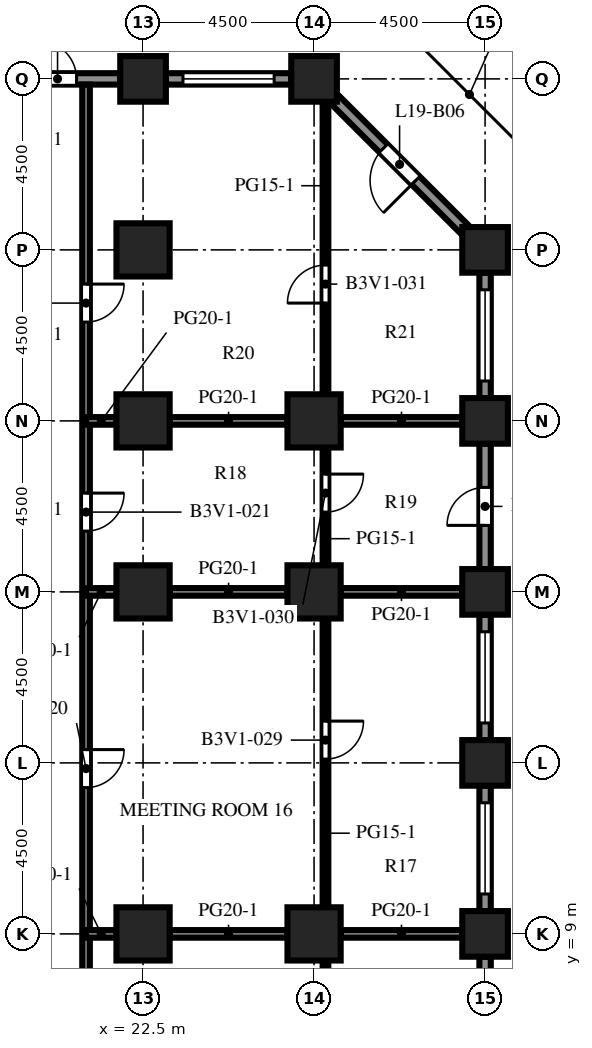
"""IFC4 building model, lengths in metres.
Left out: names, types, materials, properties, quantities, classifications, styles, units other than length and angle.
Written with IfcOpenShell. Run it as: python <this file> out.ifc"""

import sys

from ifc_helpers import new_model, si_unit, direction, frame, frame_2d, origin, origin_2d, place, context, subcontext, project, spatial, rectangle, extrude, element, fill, save


model = new_model("IFC4")
c1 = context("Model", 3, precision=1e-05, world=origin(), true_north=direction((0.0, 1.0)))
c2 = subcontext(c1, "Body", "Model", "MODEL_VIEW")
j1 = project(units=[si_unit("LENGTHUNIT", "METRE"), si_unit("PLANEANGLEUNIT", "RADIAN")], contexts=[c1])
p1 = place(None, origin())
s1 = spatial("IfcSite", under=j1, at=p1, CompositionType="ELEMENT")
p2 = place(p1, origin())
s2 = spatial("IfcBuilding", under=s1, at=p2, CompositionType="ELEMENT")
p3 = place(p2, frame((0.0, 0.0, 86.1)))
s3 = spatial("IfcBuildingStorey", under=s2, at=p3, CompositionType="ELEMENT", Elevation=86.1)
for number, where, z_axis, x_axis in (
    (1, (22.5, 31.5, 0.0), (0.0, 0.0, 1.0), (1.0, 0.0, 0.0)),
    (2, (27.0, 31.5, 0.0), (0.0, 0.0, 1.0), (1.0, 0.0, 0.0)),
    (3, (31.5, 9.0, 0.0), (0.0, 0.0, 1.0), (1.0, 0.0, 0.0)),
    (4, (31.5, 13.5, 0.0), (0.0, 0.0, 1.0), (1.0, 0.0, 0.0)),
    (5, (31.5, 18.0, 0.0), (0.0, 0.0, 1.0), (1.0, 0.0, 0.0)),
    (6, (31.5, 22.5, 0.0), (0.0, 0.0, 1.0), (1.0, 0.0, 0.0)),
    (7, (31.5, 27.0, 0.0), (0.0, 0.0, 1.0), (1.0, 0.0, 0.0)),
):
    element("IfcColumn", number, at=place(p3, frame(where, z_axis=z_axis, x_axis=x_axis)), inside=s3, PredefinedType="COLUMN", context=c2, shape_type="SweptSolid", body=[
        extrude(rectangle(XDim=1.2, YDim=1.2, at=origin_2d()), origin(), (0.0, 0.0, 1.0), 4.1),
    ])
for number, where, z_axis, x_axis in (
    (8, (22.5, 9.0, 0.0), (0.0, 0.0, 1.0), (1.0, 0.0, 0.0)),
    (9, (22.5, 18.0, 0.0), (0.0, 0.0, 1.0), (1.0, 0.0, 0.0)),
    (10, (22.5, 22.5, 0.0), (0.0, 0.0, 1.0), (1.0, 0.0, 0.0)),
    (11, (22.5, 27.0, 0.0), (0.0, 0.0, 1.0), (1.0, 0.0, 0.0)),
    (12, (27.0, 9.0, 0.0), (0.0, 0.0, 1.0), (1.0, 0.0, 0.0)),
    (13, (27.0, 18.0, 0.0), (0.0, 0.0, 1.0), (1.0, 0.0, 0.0)),
    (14, (27.0, 22.5, 0.0), (0.0, 0.0, 1.0), (1.0, 0.0, 0.0)),
):
    element("IfcColumn", number, at=place(p3, frame(where, z_axis=z_axis, x_axis=x_axis)), inside=s3, PredefinedType="COLUMN", context=c2, shape_type="SweptSolid", body=[
        extrude(rectangle(XDim=1.4, YDim=1.4, at=origin_2d()), origin(), (0.0, 0.0, 1.0), 4.1),
    ])
p4 = place(p3, frame((31.5, 8.4, 0.0), z_axis=(0.0, 0.0, 1.0), x_axis=(0.0, -1.0, 0.0)))
e15 = element("IfcWall", 15, at=p4, inside=s3, PredefinedType="SOLIDWALL", context=c2, shape_type="SweptSolid", body=[
    extrude(rectangle(XDim=3.3, YDim=0.3, at=frame_2d((1.65, 0.0))), origin(), (0.0, 0.0, 1.0), 2.75),
])
p5 = place(p4, frame((0.45, 0.0, 0.8)))
e16 = element("IfcOpeningElement", 16, at=p5, cuts=e15, PredefinedType="OPENING", context=c2, shape_type="SweptSolid", body=[
    extrude(rectangle(XDim=2.4, YDim=1.7, at=frame_2d((1.2, 0.85))), frame((0.0, 0.16, 0.0), z_axis=(0.0, -1.0, 0.0), x_axis=(1.0, 0.0, 0.0)), (0.0, 0.0, 1.0), 0.32),
])
p6 = place(p3, frame((31.5, 12.9, 0.0), z_axis=(0.0, 0.0, 1.0), x_axis=(0.0, -1.0, 0.0)))
e17 = element("IfcWall", 17, at=p6, inside=s3, PredefinedType="SOLIDWALL", context=c2, shape_type="SweptSolid", body=[
    extrude(rectangle(XDim=3.3, YDim=0.3, at=frame_2d((1.65, 0.0))), origin(), (0.0, 0.0, 1.0), 2.75),
])
p7 = place(p6, frame((0.45, 0.0, 0.8)))
e18 = element("IfcOpeningElement", 18, at=p7, cuts=e17, PredefinedType="OPENING", context=c2, shape_type="SweptSolid", body=[
    extrude(rectangle(XDim=2.4, YDim=1.7, at=frame_2d((1.2, 0.85))), frame((0.0, 0.16, 0.0), z_axis=(0.0, -1.0, 0.0), x_axis=(1.0, 0.0, 0.0)), (0.0, 0.0, 1.0), 0.32),
])
p8 = place(p3, frame((31.5, 17.4, 0.0), z_axis=(0.0, 0.0, 1.0), x_axis=(0.0, -1.0, 0.0)))
e19 = element("IfcWall", 19, at=p8, inside=s3, PredefinedType="SOLIDWALL", context=c2, shape_type="SweptSolid", body=[
    extrude(rectangle(XDim=3.3, YDim=0.3, at=frame_2d((1.65, 0.0))), origin(), (0.0, 0.0, 1.0), 2.75),
])
p9 = place(p8, frame((0.45, 0.0, 0.8)))
e20 = element("IfcOpeningElement", 20, at=p9, cuts=e19, PredefinedType="OPENING", context=c2, shape_type="SweptSolid", body=[
    extrude(rectangle(XDim=2.4, YDim=1.7, at=frame_2d((1.2, 0.85))), frame((0.0, 0.16, 0.0), z_axis=(0.0, -1.0, 0.0), x_axis=(1.0, 0.0, 0.0)), (0.0, 0.0, 1.0), 0.32),
])
p10 = place(p3, frame((31.5, 21.9, 0.0), z_axis=(0.0, 0.0, 1.0), x_axis=(0.0, -1.0, 0.0)))
e21 = element("IfcWall", 21, at=p10, inside=s3, PredefinedType="SOLIDWALL", context=c2, shape_type="SweptSolid", body=[
    extrude(rectangle(XDim=3.3, YDim=0.3, at=frame_2d((1.65, 0.0))), origin(), (0.0, 0.0, 1.0), 2.75),
])
p11 = place(p10, frame((1.15, 0.0, 0.0)))
e22 = element("IfcOpeningElement", 22, at=p11, cuts=e21, PredefinedType="OPENING", context=c2, shape_type="SweptSolid", body=[
    extrude(rectangle(XDim=1.0, YDim=2.2, at=frame_2d((0.5, 1.1))), frame((0.0, 0.16, 0.0), z_axis=(0.0, -1.0, 0.0), x_axis=(1.0, 0.0, 0.0)), (0.0, 0.0, 1.0), 0.32),
])
p12 = place(p3, frame((31.5, 26.4, 0.0), z_axis=(0.0, 0.0, 1.0), x_axis=(0.0, -1.0, 0.0)))
e23 = element("IfcWall", 23, at=p12, inside=s3, PredefinedType="SOLIDWALL", context=c2, shape_type="SweptSolid", body=[
    extrude(rectangle(XDim=3.3, YDim=0.3, at=frame_2d((1.65, 0.0))), origin(), (0.0, 0.0, 1.0), 2.75),
])
p13 = place(p12, frame((0.45, 0.0, 0.8)))
e24 = element("IfcOpeningElement", 24, at=p13, cuts=e23, PredefinedType="OPENING", context=c2, shape_type="SweptSolid", body=[
    extrude(rectangle(XDim=2.4, YDim=1.7, at=frame_2d((1.2, 0.85))), frame((0.0, 0.16, 0.0), z_axis=(0.0, -1.0, 0.0), x_axis=(1.0, 0.0, 0.0)), (0.0, 0.0, 1.0), 0.32),
])
p14 = place(p3, frame((27.494, 31.006, 0.0), z_axis=(0.0, 0.0, 1.0), x_axis=(0.707106781187, -0.707106781187, 0.0)))
e25 = element("IfcWall", 25, at=p14, inside=s3, PredefinedType="SOLIDWALL", context=c2, shape_type="SweptSolid", body=[
    extrude(rectangle(XDim=4.967, YDim=0.3, at=frame_2d((2.483, 0.0))), origin(), (0.0, 0.0, 1.0), 2.75),
])
p15 = place(p14, frame((1.884, 0.0, 0.0)))
e26 = element("IfcOpeningElement", 26, at=p15, cuts=e25, PredefinedType="OPENING", context=c2, shape_type="SweptSolid", body=[
    extrude(rectangle(XDim=1.2, YDim=2.2, at=frame_2d((0.6, 1.1))), frame((0.0, 0.16, 0.0), z_axis=(0.0, -1.0, 0.0), x_axis=(1.0, 0.0, 0.0)), (0.0, 0.0, 1.0), 0.32),
])
p16 = place(p3, frame((23.1, 31.5, 0.0), z_axis=(0.0, 0.0, 1.0), x_axis=(1.0, 0.0, 0.0)))
e27 = element("IfcWall", 27, at=p16, inside=s3, PredefinedType="SOLIDWALL", context=c2, shape_type="SweptSolid", body=[
    extrude(rectangle(XDim=3.3, YDim=0.3, at=frame_2d((1.65, 0.0))), origin(), (0.0, 0.0, 1.0), 2.75),
])
p17 = place(p16, frame((0.45, 0.0, 0.8)))
e28 = element("IfcOpeningElement", 28, at=p17, cuts=e27, PredefinedType="OPENING", context=c2, shape_type="SweptSolid", body=[
    extrude(rectangle(XDim=2.4, YDim=1.7, at=frame_2d((1.2, 0.85))), frame((0.0, 0.16, 0.0), z_axis=(0.0, -1.0, 0.0), x_axis=(1.0, 0.0, 0.0)), (0.0, 0.0, 1.0), 0.32),
])
p18 = place(p3, frame((18.6, 31.5, 0.0), z_axis=(0.0, 0.0, 1.0), x_axis=(1.0, 0.0, 0.0)))
e29 = element("IfcWall", 29, at=p18, inside=s3, PredefinedType="SOLIDWALL", context=c2, shape_type="SweptSolid", body=[
    extrude(rectangle(XDim=3.3, YDim=0.3, at=frame_2d((1.65, 0.0))), origin(), (0.0, 0.0, 1.0), 2.75),
])
p19 = place(p18, frame((1.15, 0.0, 0.0)))
e30 = element("IfcOpeningElement", 30, at=p19, cuts=e29, PredefinedType="OPENING", context=c2, shape_type="SweptSolid", body=[
    extrude(rectangle(XDim=1.0, YDim=2.2, at=frame_2d((0.5, 1.1))), frame((0.0, 0.16, 0.0), z_axis=(0.0, -1.0, 0.0), x_axis=(1.0, 0.0, 0.0)), (0.0, 0.0, 1.0), 0.32),
])
p20 = place(p3, frame((21.0, 31.35, 0.0), z_axis=(0.0, 0.0, 1.0), x_axis=(0.0, -1.0, 0.0)))
e31 = element("IfcWall", 31, at=p20, inside=s3, PredefinedType="PARTITIONING", context=c2, shape_type="SweptSolid", body=[
    extrude(rectangle(XDim=53.7, YDim=0.2, at=frame_2d((26.85, 0.0))), origin(), (0.0, 0.0, 1.0), 3.65),
])
p21 = place(p20, frame((47.5, 0.0, 0.0)))
e32 = element("IfcOpeningElement", 32, at=p21, cuts=e31, PredefinedType="OPENING", context=c2, shape_type="SweptSolid", body=[
    extrude(rectangle(XDim=1.0, YDim=2.1, at=frame_2d((0.5, 1.05))), frame((0.0, 0.11, 0.0), z_axis=(0.0, -1.0, 0.0), x_axis=(1.0, 0.0, 0.0)), (0.0, 0.0, 1.0), 0.22),
])
p22 = place(p20, frame((37.5, 0.0, 0.0)))
e33 = element("IfcOpeningElement", 33, at=p22, cuts=e31, PredefinedType="OPENING", context=c2, shape_type="SweptSolid", body=[
    extrude(rectangle(XDim=1.0, YDim=2.1, at=frame_2d((0.5, 1.05))), frame((0.0, 0.11, 0.0), z_axis=(0.0, -1.0, 0.0), x_axis=(1.0, 0.0, 0.0)), (0.0, 0.0, 1.0), 0.22),
])
p23 = place(p20, frame((27.25, 0.0, 0.0)))
e34 = element("IfcOpeningElement", 34, at=p23, cuts=e31, PredefinedType="OPENING", context=c2, shape_type="SweptSolid", body=[
    extrude(rectangle(XDim=1.0, YDim=2.1, at=frame_2d((0.5, 1.05))), frame((0.0, 0.11, 0.0), z_axis=(0.0, -1.0, 0.0), x_axis=(1.0, 0.0, 0.0)), (0.0, 0.0, 1.0), 0.22),
])
p24 = place(p20, frame((17.5, 0.0, 0.0)))
e35 = element("IfcOpeningElement", 35, at=p24, cuts=e31, PredefinedType="OPENING", context=c2, shape_type="SweptSolid", body=[
    extrude(rectangle(XDim=1.0, YDim=2.1, at=frame_2d((0.5, 1.05))), frame((0.0, 0.11, 0.0), z_axis=(0.0, -1.0, 0.0), x_axis=(1.0, 0.0, 0.0)), (0.0, 0.0, 1.0), 0.22),
])
p25 = place(p20, frame((10.75, 0.0, 0.0)))
e36 = element("IfcOpeningElement", 36, at=p25, cuts=e31, PredefinedType="OPENING", context=c2, shape_type="SweptSolid", body=[
    extrude(rectangle(XDim=1.0, YDim=2.1, at=frame_2d((0.5, 1.05))), frame((0.0, 0.11, 0.0), z_axis=(0.0, -1.0, 0.0), x_axis=(1.0, 0.0, 0.0)), (0.0, 0.0, 1.0), 0.22),
])
p26 = place(p20, frame((5.25, 0.0, 0.0)))
e37 = element("IfcOpeningElement", 37, at=p26, cuts=e31, PredefinedType="OPENING", context=c2, shape_type="SweptSolid", body=[
    extrude(rectangle(XDim=1.0, YDim=2.1, at=frame_2d((0.5, 1.05))), frame((0.0, 0.11, 0.0), z_axis=(0.0, -1.0, 0.0), x_axis=(1.0, 0.0, 0.0)), (0.0, 0.0, 1.0), 0.22),
])
p27 = place(p3, frame((27.3, 8.3, 0.0), z_axis=(0.0, 0.0, 1.0), x_axis=(0.0, -1.0, 0.0)))
e38 = element("IfcWall", 38, at=p27, inside=s3, PredefinedType="PARTITIONING", context=c2, shape_type="SweptSolid", body=[
    extrude(rectangle(XDim=7.6, YDim=0.15, at=frame_2d((3.8, 0.0))), origin(), (0.0, 0.0, 1.0), 3.65),
])
p28 = place(p27, frame((2.7, 0.0, 0.0)))
e39 = element("IfcOpeningElement", 39, at=p28, cuts=e38, PredefinedType="OPENING", context=c2, shape_type="SweptSolid", body=[
    extrude(rectangle(XDim=1.0, YDim=2.1, at=frame_2d((0.5, 1.05))), frame((0.0, 0.085, 0.0), z_axis=(0.0, -1.0, 0.0), x_axis=(1.0, 0.0, 0.0)), (0.0, 0.0, 1.0), 0.17),
])
p29 = place(p3, frame((27.3, 17.3, 0.0), z_axis=(0.0, 0.0, 1.0), x_axis=(0.0, -1.0, 0.0)))
e40 = element("IfcWall", 40, at=p29, inside=s3, PredefinedType="PARTITIONING", context=c2, shape_type="SweptSolid", body=[
    extrude(rectangle(XDim=7.6, YDim=0.15, at=frame_2d((3.8, 0.0))), origin(), (0.0, 0.0, 1.0), 3.65),
])
p30 = place(p29, frame((2.7, 0.0, 0.0)))
e41 = element("IfcOpeningElement", 41, at=p30, cuts=e40, PredefinedType="OPENING", context=c2, shape_type="SweptSolid", body=[
    extrude(rectangle(XDim=1.0, YDim=2.1, at=frame_2d((0.5, 1.05))), frame((0.0, 0.085, 0.0), z_axis=(0.0, -1.0, 0.0), x_axis=(1.0, 0.0, 0.0)), (0.0, 0.0, 1.0), 0.17),
])
p31 = place(p3, frame((27.3, 21.8, 0.0), z_axis=(0.0, 0.0, 1.0), x_axis=(0.0, -1.0, 0.0)))
e42 = element("IfcWall", 42, at=p31, inside=s3, PredefinedType="PARTITIONING", context=c2, shape_type="SweptSolid", body=[
    extrude(rectangle(XDim=3.1, YDim=0.15, at=frame_2d((1.55, 0.0))), origin(), (0.0, 0.0, 1.0), 3.65),
])
p32 = place(p31, frame((0.7, 0.0, 0.0)))
e43 = element("IfcOpeningElement", 43, at=p32, cuts=e42, PredefinedType="OPENING", context=c2, shape_type="SweptSolid", body=[
    extrude(rectangle(XDim=1.0, YDim=2.1, at=frame_2d((0.5, 1.05))), frame((0.0, 0.085, 0.0), z_axis=(0.0, -1.0, 0.0), x_axis=(1.0, 0.0, 0.0)), (0.0, 0.0, 1.0), 0.17),
])
p33 = place(p3, frame((27.3, 30.777, 0.0), z_axis=(0.0, 0.0, 1.0), x_axis=(0.0, -1.0, 0.0)))
e44 = element("IfcWall", 44, at=p33, inside=s3, PredefinedType="PARTITIONING", context=c2, shape_type="SweptSolid", body=[
    extrude(rectangle(XDim=7.577, YDim=0.15, at=frame_2d((3.789, 0.0))), origin(), (0.0, 0.0, 1.0), 3.65),
])
p34 = place(p33, frame((4.177, 0.0, 0.0)))
e45 = element("IfcOpeningElement", 45, at=p34, cuts=e44, PredefinedType="OPENING", context=c2, shape_type="SweptSolid", body=[
    extrude(rectangle(XDim=1.0, YDim=2.1, at=frame_2d((0.5, 1.05))), frame((0.0, 0.085, 0.0), z_axis=(0.0, -1.0, 0.0), x_axis=(1.0, 0.0, 0.0)), (0.0, 0.0, 1.0), 0.17),
])
p35 = place(p3, frame((21.0, 9.0, 0.0), z_axis=(0.0, 0.0, 1.0), x_axis=(1.0, 0.0, 0.0)))
e46 = element("IfcWall", 46, at=p35, inside=s3, PredefinedType="PARTITIONING", context=c2, shape_type="SweptSolid", body=[
    extrude(rectangle(XDim=0.8, YDim=0.2, at=frame_2d((0.4, 0.0))), origin(), (0.0, 0.0, 1.0), 3.65),
])
p36 = place(p3, frame((23.2, 9.0, 0.0), z_axis=(0.0, 0.0, 1.0), x_axis=(1.0, 0.0, 0.0)))
e47 = element("IfcWall", 47, at=p36, inside=s3, PredefinedType="PARTITIONING", context=c2, shape_type="SweptSolid", body=[
    extrude(rectangle(XDim=3.1, YDim=0.2, at=frame_2d((1.55, 0.0))), origin(), (0.0, 0.0, 1.0), 3.65),
])
p37 = place(p3, frame((27.7, 9.0, 0.0), z_axis=(0.0, 0.0, 1.0), x_axis=(1.0, 0.0, 0.0)))
e48 = element("IfcWall", 48, at=p37, inside=s3, PredefinedType="PARTITIONING", context=c2, shape_type="SweptSolid", body=[
    extrude(rectangle(XDim=3.2, YDim=0.2, at=frame_2d((1.6, 0.0))), origin(), (0.0, 0.0, 1.0), 3.65),
])
p38 = place(p3, frame((21.0, 18.0, 0.0), z_axis=(0.0, 0.0, 1.0), x_axis=(1.0, 0.0, 0.0)))
e49 = element("IfcWall", 49, at=p38, inside=s3, PredefinedType="PARTITIONING", context=c2, shape_type="SweptSolid", body=[
    extrude(rectangle(XDim=0.8, YDim=0.2, at=frame_2d((0.4, 0.0))), origin(), (0.0, 0.0, 1.0), 3.65),
])
p39 = place(p3, frame((23.2, 18.0, 0.0), z_axis=(0.0, 0.0, 1.0), x_axis=(1.0, 0.0, 0.0)))
e50 = element("IfcWall", 50, at=p39, inside=s3, PredefinedType="PARTITIONING", context=c2, shape_type="SweptSolid", body=[
    extrude(rectangle(XDim=3.1, YDim=0.2, at=frame_2d((1.55, 0.0))), origin(), (0.0, 0.0, 1.0), 3.65),
])
p40 = place(p3, frame((27.7, 18.0, 0.0), z_axis=(0.0, 0.0, 1.0), x_axis=(1.0, 0.0, 0.0)))
e51 = element("IfcWall", 51, at=p40, inside=s3, PredefinedType="PARTITIONING", context=c2, shape_type="SweptSolid", body=[
    extrude(rectangle(XDim=3.2, YDim=0.2, at=frame_2d((1.6, 0.0))), origin(), (0.0, 0.0, 1.0), 3.65),
])
p41 = place(p3, frame((21.0, 22.5, 0.0), z_axis=(0.0, 0.0, 1.0), x_axis=(1.0, 0.0, 0.0)))
e52 = element("IfcWall", 52, at=p41, inside=s3, PredefinedType="PARTITIONING", context=c2, shape_type="SweptSolid", body=[
    extrude(rectangle(XDim=0.8, YDim=0.2, at=frame_2d((0.4, 0.0))), origin(), (0.0, 0.0, 1.0), 3.65),
])
p42 = place(p3, frame((23.2, 22.5, 0.0), z_axis=(0.0, 0.0, 1.0), x_axis=(1.0, 0.0, 0.0)))
e53 = element("IfcWall", 53, at=p42, inside=s3, PredefinedType="PARTITIONING", context=c2, shape_type="SweptSolid", body=[
    extrude(rectangle(XDim=3.1, YDim=0.2, at=frame_2d((1.55, 0.0))), origin(), (0.0, 0.0, 1.0), 3.65),
])
p43 = place(p3, frame((27.7, 22.5, 0.0), z_axis=(0.0, 0.0, 1.0), x_axis=(1.0, 0.0, 0.0)))
e54 = element("IfcWall", 54, at=p43, inside=s3, PredefinedType="PARTITIONING", context=c2, shape_type="SweptSolid", body=[
    extrude(rectangle(XDim=3.2, YDim=0.2, at=frame_2d((1.6, 0.0))), origin(), (0.0, 0.0, 1.0), 3.65),
])
p44 = place(p7, origin())
e55 = element("IfcWindow", 55, at=p44, inside=s3, PartitioningType="SINGLE_PANEL", PredefinedType="WINDOW", context=c2, shape_type="SweptSolid", body=[
    extrude(rectangle(XDim=2.4, YDim=1.7, at=frame_2d((1.2, 0.85))), frame((0.0, 0.03, 0.0), z_axis=(0.0, -1.0, 0.0), x_axis=(1.0, 0.0, 0.0)), (0.0, 0.0, 1.0), 0.06),
])
fill(e18, e55)
p45 = place(p9, origin())
e56 = element("IfcWindow", 56, at=p45, inside=s3, PartitioningType="SINGLE_PANEL", PredefinedType="WINDOW", context=c2, shape_type="SweptSolid", body=[
    extrude(rectangle(XDim=2.4, YDim=1.7, at=frame_2d((1.2, 0.85))), frame((0.0, 0.03, 0.0), z_axis=(0.0, -1.0, 0.0), x_axis=(1.0, 0.0, 0.0)), (0.0, 0.0, 1.0), 0.06),
])
fill(e20, e56)
p46 = place(p11, origin())
e57 = element("IfcDoor", 57, at=p46, inside=s3, OperationType="SINGLE_SWING_RIGHT", PredefinedType="DOOR", context=c2, shape_type="SweptSolid", body=[
    extrude(rectangle(XDim=1.0, YDim=2.2, at=frame_2d((0.5, 1.1))), frame((0.0, 0.025, 0.0), z_axis=(0.0, -1.0, 0.0), x_axis=(1.0, 0.0, 0.0)), (0.0, 0.0, 1.0), 0.05),
])
fill(e22, e57)
p47 = place(p13, origin())
e58 = element("IfcWindow", 58, at=p47, inside=s3, PartitioningType="SINGLE_PANEL", PredefinedType="WINDOW", context=c2, shape_type="SweptSolid", body=[
    extrude(rectangle(XDim=2.4, YDim=1.7, at=frame_2d((1.2, 0.85))), frame((0.0, 0.03, 0.0), z_axis=(0.0, -1.0, 0.0), x_axis=(1.0, 0.0, 0.0)), (0.0, 0.0, 1.0), 0.06),
])
fill(e24, e58)
p48 = place(p15, origin())
e59 = element("IfcDoor", 59, at=p48, inside=s3, OperationType="SINGLE_SWING_RIGHT", PredefinedType="DOOR", context=c2, shape_type="SweptSolid", body=[
    extrude(rectangle(XDim=1.2, YDim=2.2, at=frame_2d((0.6, 1.1))), frame((0.0, 0.025, 0.0), z_axis=(0.0, -1.0, 0.0), x_axis=(1.0, 0.0, 0.0)), (0.0, 0.0, 1.0), 0.05),
])
fill(e26, e59)
p49 = place(p17, origin())
e60 = element("IfcWindow", 60, at=p49, inside=s3, PartitioningType="SINGLE_PANEL", PredefinedType="WINDOW", context=c2, shape_type="SweptSolid", body=[
    extrude(rectangle(XDim=2.4, YDim=1.7, at=frame_2d((1.2, 0.85))), frame((0.0, 0.03, 0.0), z_axis=(0.0, -1.0, 0.0), x_axis=(1.0, 0.0, 0.0)), (0.0, 0.0, 1.0), 0.06),
])
fill(e28, e60)
p50 = place(p19, origin())
e61 = element("IfcDoor", 61, at=p50, inside=s3, OperationType="SINGLE_SWING_LEFT", PredefinedType="DOOR", context=c2, shape_type="SweptSolid", body=[
    extrude(rectangle(XDim=1.0, YDim=2.2, at=frame_2d((0.5, 1.1))), frame((0.0, 0.025, 0.0), z_axis=(0.0, -1.0, 0.0), x_axis=(1.0, 0.0, 0.0)), (0.0, 0.0, 1.0), 0.05),
])
fill(e30, e61)
p51 = place(p24, origin())
e62 = element("IfcDoor", 62, at=p51, inside=s3, OperationType="SINGLE_SWING_LEFT", PredefinedType="DOOR", context=c2, shape_type="SweptSolid", body=[
    extrude(rectangle(XDim=1.0, YDim=2.1, at=frame_2d((0.5, 1.05))), frame((0.0, 0.025, 0.0), z_axis=(0.0, -1.0, 0.0), x_axis=(1.0, 0.0, 0.0)), (0.0, 0.0, 1.0), 0.05),
])
fill(e35, e62)
p52 = place(p25, origin())
e63 = element("IfcDoor", 63, at=p52, inside=s3, OperationType="SINGLE_SWING_LEFT", PredefinedType="DOOR", context=c2, shape_type="SweptSolid", body=[
    extrude(rectangle(XDim=1.0, YDim=2.1, at=frame_2d((0.5, 1.05))), frame((0.0, 0.025, 0.0), z_axis=(0.0, -1.0, 0.0), x_axis=(1.0, 0.0, 0.0)), (0.0, 0.0, 1.0), 0.05),
])
fill(e36, e63)
p53 = place(p26, origin())
e64 = element("IfcDoor", 64, at=p53, inside=s3, OperationType="SINGLE_SWING_LEFT", PredefinedType="DOOR", context=c2, shape_type="SweptSolid", body=[
    extrude(rectangle(XDim=1.0, YDim=2.1, at=frame_2d((0.5, 1.05))), frame((0.0, 0.025, 0.0), z_axis=(0.0, -1.0, 0.0), x_axis=(1.0, 0.0, 0.0)), (0.0, 0.0, 1.0), 0.05),
])
fill(e37, e64)
p54 = place(p30, origin())
e65 = element("IfcDoor", 65, at=p54, inside=s3, OperationType="SINGLE_SWING_LEFT", PredefinedType="DOOR", context=c2, shape_type="SweptSolid", body=[
    extrude(rectangle(XDim=1.0, YDim=2.1, at=frame_2d((0.5, 1.05))), frame((0.0, 0.025, 0.0), z_axis=(0.0, -1.0, 0.0), x_axis=(1.0, 0.0, 0.0)), (0.0, 0.0, 1.0), 0.05),
])
fill(e41, e65)
p55 = place(p32, origin())
e66 = element("IfcDoor", 66, at=p55, inside=s3, OperationType="SINGLE_SWING_LEFT", PredefinedType="DOOR", context=c2, shape_type="SweptSolid", body=[
    extrude(rectangle(XDim=1.0, YDim=2.1, at=frame_2d((0.5, 1.05))), frame((0.0, 0.025, 0.0), z_axis=(0.0, -1.0, 0.0), x_axis=(1.0, 0.0, 0.0)), (0.0, 0.0, 1.0), 0.05),
])
fill(e43, e66)
p56 = place(p34, origin())
e67 = element("IfcDoor", 67, at=p56, inside=s3, OperationType="SINGLE_SWING_RIGHT", PredefinedType="DOOR", context=c2, shape_type="SweptSolid", body=[
    extrude(rectangle(XDim=1.0, YDim=2.1, at=frame_2d((0.5, 1.05))), frame((0.0, 0.025, 0.0), z_axis=(0.0, -1.0, 0.0), x_axis=(1.0, 0.0, 0.0)), (0.0, 0.0, 1.0), 0.05),
])
fill(e45, e67)
save(model, sys.argv[1])
